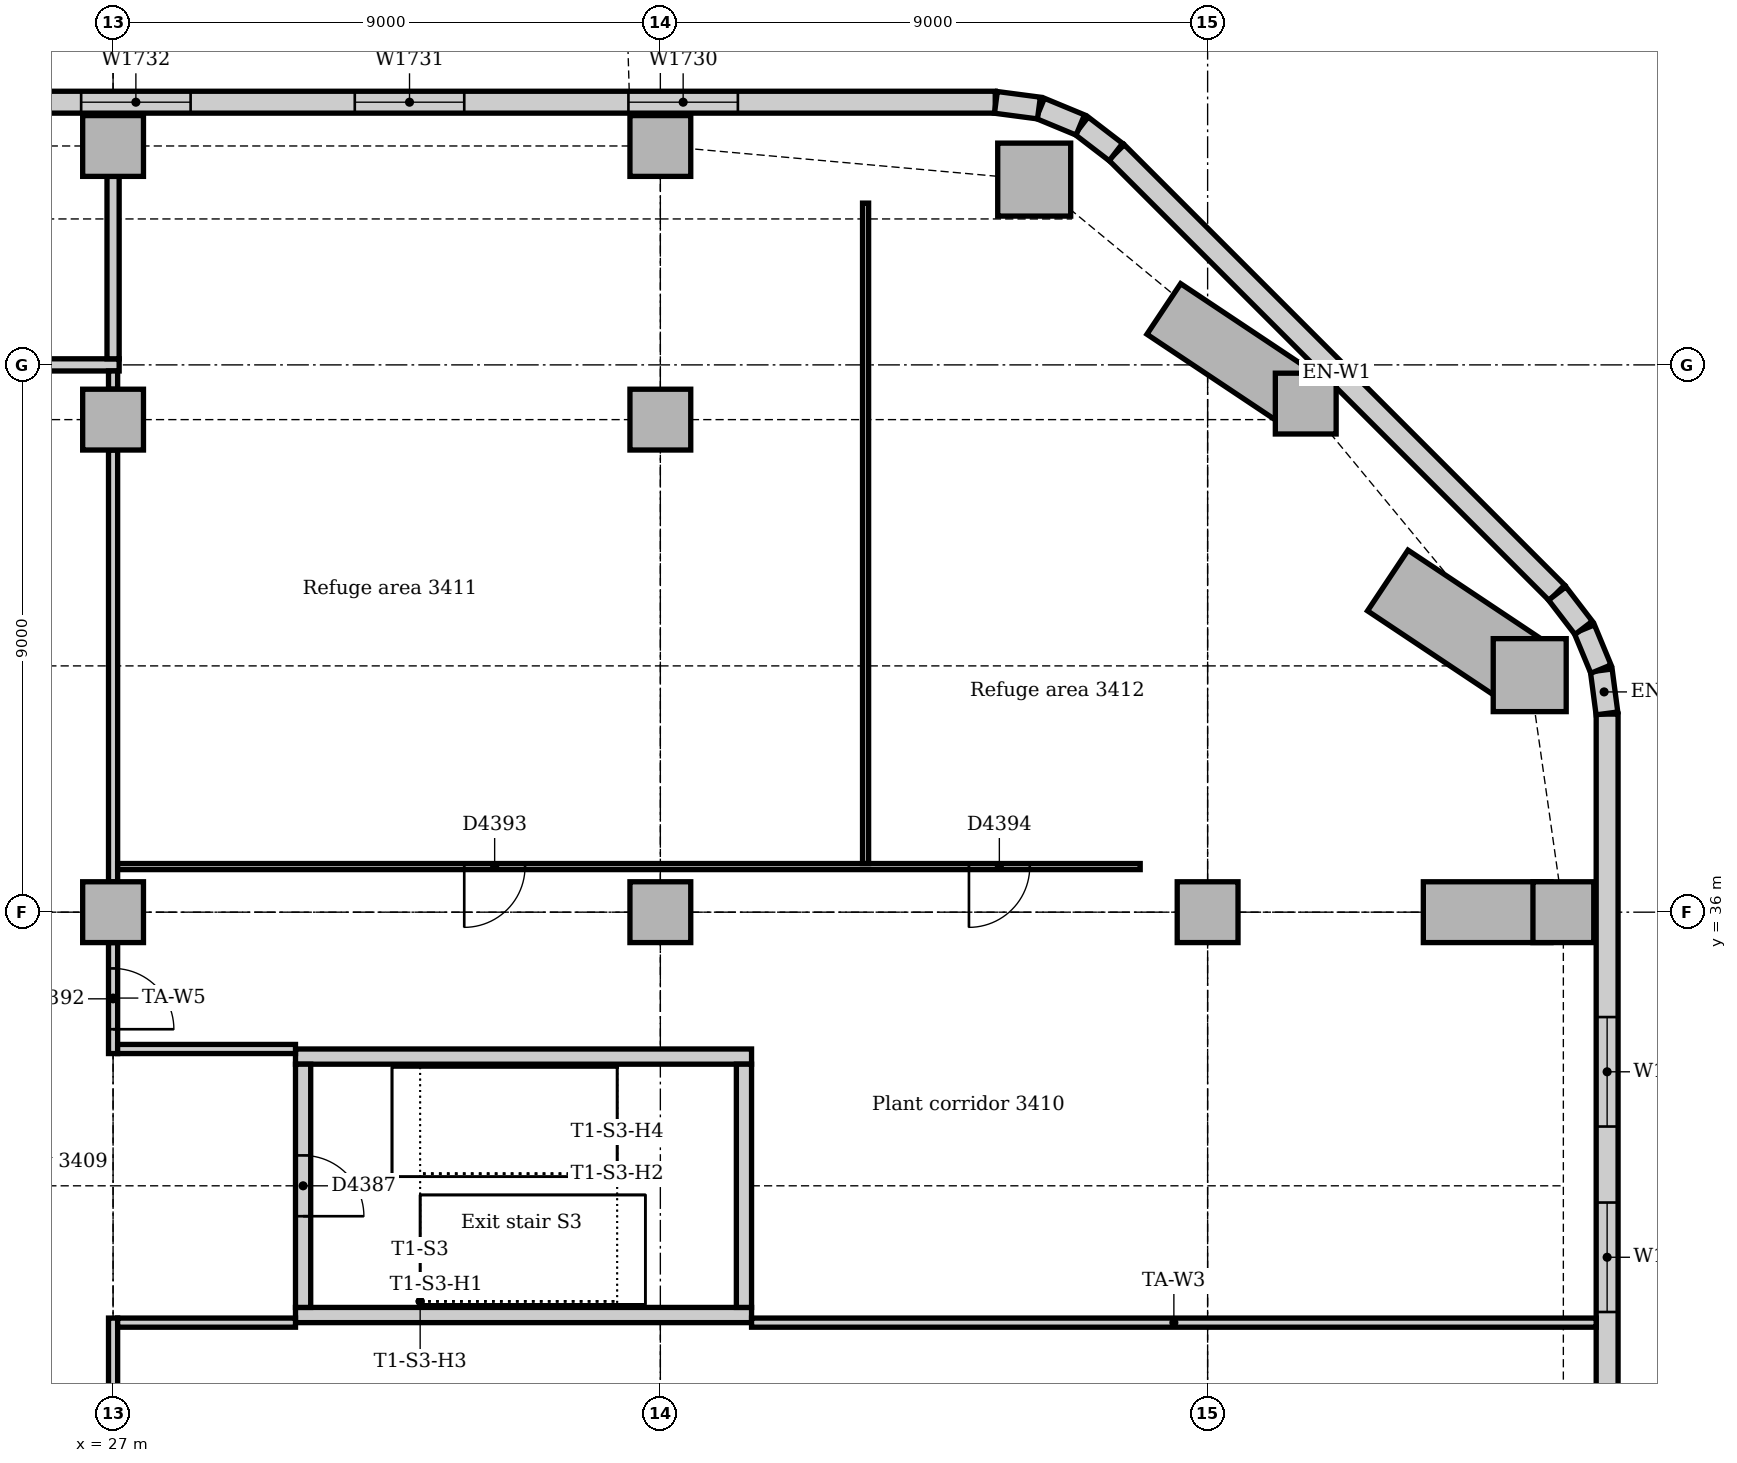
"""IFC4 building model, lengths in metres.
Left out: names, types, materials, properties, quantities, classifications, styles, units other than length and angle.
Written with IfcOpenShell. Run it as: python <this file> out.ifc"""

import sys

from ifc_helpers import new_model, si_unit, direction, frame, frame_2d, origin, origin_2d, place, context, subcontext, project, spatial, rectangle, extrude, element, fill, save


model = new_model("IFC4")
c1 = context("Model", 3, precision=1e-05, world=origin(), true_north=direction((0.0, 1.0)))
c2 = subcontext(c1, "Body", "Model", "MODEL_VIEW")
j1 = project(units=[si_unit("LENGTHUNIT", "METRE"), si_unit("PLANEANGLEUNIT", "RADIAN")], contexts=[c1])
p1 = place(None, origin())
s1 = spatial("IfcSite", under=j1, at=p1, CompositionType="ELEMENT")
p2 = place(p1, origin())
s2 = spatial("IfcBuilding", under=s1, at=p2, CompositionType="ELEMENT")
p3 = place(p2, frame((0.0, 0.0, 144.0)))
s3 = spatial("IfcBuildingStorey", under=s2, at=p3, CompositionType="ELEMENT", Elevation=144.0)
for number, where, z_axis, x_axis in (
    (1, (30.0, 29.375, 0.0), (0.0, 0.0, 1.0), (1.0, 0.0, 0.0)),
    (2, (37.5, 33.625, 0.0), (0.0, 0.0, 1.0), (-1.0, 0.0, 0.0)),
):
    element("IfcWall", number, at=place(p3, frame(where, z_axis=z_axis, x_axis=x_axis)), inside=s3, PredefinedType="SOLIDWALL", context=c2, shape_type="SweptSolid", body=[
        extrude(rectangle(XDim=7.5, YDim=0.25, at=frame_2d((3.75, 0.0))), origin(), (0.0, 0.0, 1.0), 5.0),
    ])
p4 = place(p3, frame((37.375, 29.5, 0.0), z_axis=(0.0, 0.0, 1.0), x_axis=(0.0, 1.0, 0.0)))
e3 = element("IfcWall", 3, at=p4, inside=s3, PredefinedType="SOLIDWALL", context=c2, shape_type="SweptSolid", body=[
    extrude(rectangle(XDim=4.0, YDim=0.25, at=frame_2d((2.0, 0.0))), origin(), (0.0, 0.0, 1.0), 5.0),
])
p5 = place(p3, frame((30.125, 33.5, 0.0), z_axis=(0.0, 0.0, 1.0), x_axis=(0.0, -1.0, 0.0)))
e4 = element("IfcWall", 4, at=p5, inside=s3, PredefinedType="SOLIDWALL", context=c2, shape_type="SweptSolid", body=[
    extrude(rectangle(XDim=4.0, YDim=0.25, at=frame_2d((2.0, 0.0))), origin(), (0.0, 0.0, 1.0), 5.0),
])
p6 = place(p5, frame((1.5, 0.0, 0.0)))
e5 = element("IfcOpeningElement", 5, at=p6, cuts=e4, PredefinedType="OPENING", context=c2, shape_type="SweptSolid", body=[
    extrude(rectangle(XDim=1.0, YDim=2.1, at=frame_2d((0.5, 1.05))), frame((0.0, 0.135, 0.0), z_axis=(0.0, -1.0, 0.0), x_axis=(1.0, 0.0, 0.0)), (0.0, 0.0, 1.0), 0.27),
])
for number, where, z_axis, x_axis in (
    (6, (50.297, 39.898, 0.0), (0.0, 0.0, 1.0), (1.0, 0.0, 0.0)),
    (7, (42.148, 48.047, 0.0), (0.0, 0.0, 1.0), (1.0, 0.0, 0.0)),
):
    element("IfcColumn", number, at=place(p3, frame(where, z_axis=z_axis, x_axis=x_axis)), inside=s3, PredefinedType="COLUMN", context=c2, shape_type="SweptSolid", body=[
        extrude(rectangle(XDim=1.2, YDim=1.2, at=origin_2d()), origin(), (0.0, 0.0, 1.0), 4.85),
    ])
for number, where, z_axis, x_axis in (
    (8, (50.85, 36.0, 0.0), (0.0, 0.0, 1.0), (1.0, 0.0, 0.0)),
    (9, (46.614, 44.364, 0.0), (0.0, 0.0, 1.0), (1.0, 0.0, 0.0)),
    (10, (27.0, 48.6, 0.0), (0.0, 0.0, 1.0), (1.0, 0.0, 0.0)),
    (11, (36.0, 48.6, 0.0), (0.0, 0.0, 1.0), (1.0, 0.0, 0.0)),
    (12, (27.0, 36.0, 0.0), (0.0, 0.0, 1.0), (1.0, 0.0, 0.0)),
    (13, (27.0, 44.1, 0.0), (0.0, 0.0, 1.0), (1.0, 0.0, 0.0)),
    (14, (36.0, 36.0, 0.0), (0.0, 0.0, 1.0), (1.0, 0.0, 0.0)),
    (15, (36.0, 44.1, 0.0), (0.0, 0.0, 1.0), (1.0, 0.0, 0.0)),
    (16, (45.0, 36.0, 0.0), (0.0, 0.0, 1.0), (1.0, 0.0, 0.0)),
):
    element("IfcColumn", number, at=place(p3, frame(where, z_axis=z_axis, x_axis=x_axis)), inside=s3, PredefinedType="COLUMN", context=c2, shape_type="SweptSolid", body=[
        extrude(rectangle(XDim=1.0, YDim=1.0, at=origin_2d()), origin(), (0.0, 0.0, 1.0), 4.85),
    ])
p7 = place(p3, frame((51.57, 14.743, 0.0), z_axis=(0.0, 0.0, 1.0), x_axis=(0.0, 1.0, 0.0)))
e17 = element("IfcWall", 17, at=p7, inside=s3, PredefinedType="STANDARD", context=c2, shape_type="SweptSolid", body=[
    extrude(rectangle(XDim=24.515, YDim=0.36, at=frame_2d((12.257, 0.0))), origin(), (0.0, 0.0, 1.0), 4.85),
])
p8 = place(p7, frame((4.257, 0.0, 0.9)))
e18 = element("IfcOpeningElement", 18, at=p8, cuts=e17, PredefinedType="OPENING", context=c2, shape_type="SweptSolid", body=[
    extrude(rectangle(XDim=1.8, YDim=2.2, at=frame_2d((0.9, 1.1))), frame((0.0, 0.19, 0.0), z_axis=(0.0, -1.0, 0.0), x_axis=(1.0, 0.0, 0.0)), (0.0, 0.0, 1.0), 0.38),
])
p9 = place(p7, frame((8.007, 0.0, 1.2)))
e19 = element("IfcOpeningElement", 19, at=p9, cuts=e17, PredefinedType="OPENING", context=c2, shape_type="SweptSolid", body=[
    extrude(rectangle(XDim=1.8, YDim=1.2, at=frame_2d((0.9, 0.6))), frame((0.0, 0.19, 0.0), z_axis=(0.0, -1.0, 0.0), x_axis=(1.0, 0.0, 0.0)), (0.0, 0.0, 1.0), 0.38),
])
p10 = place(p7, frame((14.682, 0.0, 0.9)))
e20 = element("IfcOpeningElement", 20, at=p10, cuts=e17, PredefinedType="OPENING", context=c2, shape_type="SweptSolid", body=[
    extrude(rectangle(XDim=1.8, YDim=2.2, at=frame_2d((0.9, 1.1))), frame((0.0, 0.19, 0.0), z_axis=(0.0, -1.0, 0.0), x_axis=(1.0, 0.0, 0.0)), (0.0, 0.0, 1.0), 0.38),
])
p11 = place(p7, frame((17.732, 0.0, 0.9)))
e21 = element("IfcOpeningElement", 21, at=p11, cuts=e17, PredefinedType="OPENING", context=c2, shape_type="SweptSolid", body=[
    extrude(rectangle(XDim=1.8, YDim=2.2, at=frame_2d((0.9, 1.1))), frame((0.0, 0.19, 0.0), z_axis=(0.0, -1.0, 0.0), x_axis=(1.0, 0.0, 0.0)), (0.0, 0.0, 1.0), 0.38),
])
p12 = place(p3, frame((50.744, 41.251, 0.0), z_axis=(0.0, 0.0, 1.0), x_axis=(-0.707106781187, 0.707106781187, 0.0)))
e22 = element("IfcWall", 22, at=p12, inside=s3, PredefinedType="STANDARD", context=c2, shape_type="SweptSolid", body=[
    extrude(rectangle(XDim=10.243, YDim=0.36, at=frame_2d((5.121, 0.0))), origin(), (0.0, 0.0, 1.0), 3.25),
])
p13 = place(p3, frame((41.507, 49.32, 0.0), z_axis=(0.0, 0.0, 1.0), x_axis=(-1.0, 0.0, 0.0)))
e23 = element("IfcWall", 23, at=p13, inside=s3, PredefinedType="STANDARD", context=c2, shape_type="SweptSolid", body=[
    extrude(rectangle(XDim=37.265, YDim=0.36, at=frame_2d((18.632, 0.0))), origin(), (0.0, 0.0, 1.0), 3.25),
])
p14 = place(p13, frame((4.232, 0.0, 1.2)))
e24 = element("IfcOpeningElement", 24, at=p14, cuts=e23, PredefinedType="OPENING", context=c2, shape_type="SweptSolid", body=[
    extrude(rectangle(XDim=1.8, YDim=1.2, at=frame_2d((0.9, 0.6))), frame((0.0, 0.19, 0.0), z_axis=(0.0, -1.0, 0.0), x_axis=(1.0, 0.0, 0.0)), (0.0, 0.0, 1.0), 0.38),
])
p15 = place(p13, frame((8.732, 0.0, 1.2)))
e25 = element("IfcOpeningElement", 25, at=p15, cuts=e23, PredefinedType="OPENING", context=c2, shape_type="SweptSolid", body=[
    extrude(rectangle(XDim=1.8, YDim=1.2, at=frame_2d((0.9, 0.6))), frame((0.0, 0.19, 0.0), z_axis=(0.0, -1.0, 0.0), x_axis=(1.0, 0.0, 0.0)), (0.0, 0.0, 1.0), 0.38),
])
p16 = place(p13, frame((13.232, 0.0, 1.2)))
e26 = element("IfcOpeningElement", 26, at=p16, cuts=e23, PredefinedType="OPENING", context=c2, shape_type="SweptSolid", body=[
    extrude(rectangle(XDim=1.8, YDim=1.2, at=frame_2d((0.9, 0.6))), frame((0.0, 0.19, 0.0), z_axis=(0.0, -1.0, 0.0), x_axis=(1.0, 0.0, 0.0)), (0.0, 0.0, 1.0), 0.38),
])
p17 = place(p13, frame((17.732, 0.0, 1.2)))
e27 = element("IfcOpeningElement", 27, at=p17, cuts=e23, PredefinedType="OPENING", context=c2, shape_type="SweptSolid", body=[
    extrude(rectangle(XDim=1.8, YDim=1.2, at=frame_2d((0.9, 0.6))), frame((0.0, 0.19, 0.0), z_axis=(0.0, -1.0, 0.0), x_axis=(1.0, 0.0, 0.0)), (0.0, 0.0, 1.0), 0.38),
])
p18 = place(p13, frame((22.232, 0.0, 1.2)))
e28 = element("IfcOpeningElement", 28, at=p18, cuts=e23, PredefinedType="OPENING", context=c2, shape_type="SweptSolid", body=[
    extrude(rectangle(XDim=1.8, YDim=1.2, at=frame_2d((0.9, 0.6))), frame((0.0, 0.19, 0.0), z_axis=(0.0, -1.0, 0.0), x_axis=(1.0, 0.0, 0.0)), (0.0, 0.0, 1.0), 0.38),
])
p19 = place(p13, frame((26.732, 0.0, 1.2)))
e29 = element("IfcOpeningElement", 29, at=p19, cuts=e23, PredefinedType="OPENING", context=c2, shape_type="SweptSolid", body=[
    extrude(rectangle(XDim=1.8, YDim=1.2, at=frame_2d((0.9, 0.6))), frame((0.0, 0.19, 0.0), z_axis=(0.0, -1.0, 0.0), x_axis=(1.0, 0.0, 0.0)), (0.0, 0.0, 1.0), 0.38),
])
p20 = place(p13, frame((31.232, 0.0, 1.2)))
e30 = element("IfcOpeningElement", 30, at=p20, cuts=e23, PredefinedType="OPENING", context=c2, shape_type="SweptSolid", body=[
    extrude(rectangle(XDim=1.8, YDim=1.2, at=frame_2d((0.9, 0.6))), frame((0.0, 0.19, 0.0), z_axis=(0.0, -1.0, 0.0), x_axis=(1.0, 0.0, 0.0)), (0.0, 0.0, 1.0), 0.38),
])
for number, where, z_axis, x_axis in (
    (31, (51.567, 39.269, 0.0), (0.0, 0.0, 1.0), (-0.131, 0.991, 0.0)),
    (32, (51.468, 39.997, 0.0), (0.0, 0.0, 1.0), (-0.383, 0.924, 0.0)),
):
    element("IfcWall", number, at=place(p3, frame(where, z_axis=z_axis, x_axis=x_axis)), inside=s3, PredefinedType="STANDARD", context=c2, shape_type="SweptSolid", body=[
        extrude(rectangle(XDim=0.713, YDim=0.36, at=frame_2d((0.356, 0.0))), origin(), (0.0, 0.0, 1.0), 3.25),
    ])
for number, where, z_axis, x_axis in (
    (33, (51.184, 40.675, 0.0), (0.0, 0.0, 1.0), (-0.609, 0.793, 0.0)),
    (34, (43.491, 48.5, 0.0), (0.0, 0.0, 1.0), (-0.793, 0.609, 0.0)),
):
    element("IfcWall", number, at=place(p3, frame(where, z_axis=z_axis, x_axis=x_axis)), inside=s3, PredefinedType="STANDARD", context=c2, shape_type="SweptSolid", body=[
        extrude(rectangle(XDim=0.713, YDim=0.36, at=frame_2d((0.357, 0.0))), origin(), (0.0, 0.0, 1.0), 3.25),
    ])
for number, where, z_axis, x_axis in (
    (35, (42.906, 48.945, 0.0), (0.0, 0.0, 1.0), (-0.924, 0.383, 0.0)),
    (36, (42.226, 49.224, 0.0), (0.0, 0.0, 1.0), (-0.991, 0.131, 0.0)),
):
    element("IfcWall", number, at=place(p3, frame(where, z_axis=z_axis, x_axis=x_axis)), inside=s3, PredefinedType="STANDARD", context=c2, shape_type="SweptSolid", body=[
        extrude(rectangle(XDim=0.713, YDim=0.36, at=frame_2d((0.356, 0.0))), origin(), (0.0, 0.0, 1.0), 3.25),
    ])
p21 = place(p3, frame((0.36, 45.0, 0.0), z_axis=(0.0, 0.0, 1.0), x_axis=(1.0, 0.0, 0.0)))
e37 = element("IfcWall", 37, at=p21, inside=s3, PredefinedType="PARTITIONING", context=c2, shape_type="SweptSolid", body=[
    extrude(rectangle(XDim=26.74, YDim=0.2, at=frame_2d((13.37, 0.0))), origin(), (0.0, 0.0, 1.0), 4.85),
])
p22 = place(p21, frame((9.15, 0.0, 0.0)))
e38 = element("IfcOpeningElement", 38, at=p22, cuts=e37, PredefinedType="OPENING", context=c2, shape_type="SweptSolid", body=[
    extrude(rectangle(XDim=1.0, YDim=2.1, at=frame_2d((0.5, 1.05))), frame((0.0, 0.11, 0.0), z_axis=(0.0, -1.0, 0.0), x_axis=(1.0, 0.0, 0.0)), (0.0, 0.0, 1.0), 0.22),
])
p23 = place(p21, frame((21.59, 0.0, 0.0)))
e39 = element("IfcOpeningElement", 39, at=p23, cuts=e37, PredefinedType="OPENING", context=c2, shape_type="SweptSolid", body=[
    extrude(rectangle(XDim=1.0, YDim=2.1, at=frame_2d((0.5, 1.05))), frame((0.0, 0.11, 0.0), z_axis=(0.0, -1.0, 0.0), x_axis=(1.0, 0.0, 0.0)), (0.0, 0.0, 1.0), 0.22),
])
p24 = place(p3, frame((27.0, 45.1, 0.0), z_axis=(0.0, 0.0, 1.0), x_axis=(0.0, 1.0, 0.0)))
e40 = element("IfcWall", 40, at=p24, inside=s3, PredefinedType="PARTITIONING", context=c2, shape_type="SweptSolid", body=[
    extrude(rectangle(XDim=3.0, YDim=0.2, at=frame_2d((1.5, 0.0))), origin(), (0.0, 0.0, 1.0), 4.85),
])
p25 = place(p3, frame((27.0, 33.675, 0.0), z_axis=(0.0, 0.0, 1.0), x_axis=(0.0, 1.0, 0.0)))
e41 = element("IfcWall", 41, at=p25, inside=s3, PredefinedType="PARTITIONING", context=c2, shape_type="SweptSolid", body=[
    extrude(rectangle(XDim=1.825, YDim=0.15, at=frame_2d((0.912, 0.0))), origin(), (0.0, 0.0, 1.0), 4.362),
])
p26 = place(p25, frame((0.4, 0.0, 0.0)))
e42 = element("IfcOpeningElement", 42, at=p26, cuts=e41, PredefinedType="OPENING", context=c2, shape_type="SweptSolid", body=[
    extrude(rectangle(XDim=1.0, YDim=2.1, at=frame_2d((0.5, 1.05))), frame((0.0, 0.085, 0.0), z_axis=(0.0, -1.0, 0.0), x_axis=(1.0, 0.0, 0.0)), (0.0, 0.0, 1.0), 0.17),
])
p27 = place(p3, frame((27.0, 36.5, 0.0), z_axis=(0.0, 0.0, 1.0), x_axis=(0.0, 1.0, 0.0)))
e43 = element("IfcWall", 43, at=p27, inside=s3, PredefinedType="PARTITIONING", context=c2, shape_type="SweptSolid", body=[
    extrude(rectangle(XDim=7.1, YDim=0.15, at=frame_2d((3.55, 0.0))), origin(), (0.0, 0.0, 1.0), 4.362),
])
p28 = place(p3, frame((27.0, 44.6, 0.0), z_axis=(0.0, 0.0, 1.0), x_axis=(0.0, 1.0, 0.0)))
e44 = element("IfcWall", 44, at=p28, inside=s3, PredefinedType="PARTITIONING", context=c2, shape_type="SweptSolid", body=[
    extrude(rectangle(XDim=0.3, YDim=0.15, at=frame_2d((0.15, 0.0))), origin(), (0.0, 0.0, 1.0), 4.85),
])
p29 = place(p3, frame((27.0, 27.5, 0.0), z_axis=(0.0, 0.0, 1.0), x_axis=(0.0, 1.0, 0.0)))
e45 = element("IfcWall", 45, at=p29, inside=s3, PredefinedType="PARTITIONING", context=c2, shape_type="SweptSolid", body=[
    extrude(rectangle(XDim=1.825, YDim=0.15, at=frame_2d((0.912, 0.0))), origin(), (0.0, 0.0, 1.0), 4.362),
])
for number, where, z_axis, x_axis in (
    (46, (27.075, 29.25, 0.0), (0.0, 0.0, 1.0), (1.0, 0.0, 0.0)),
    (47, (27.075, 33.75, 0.0), (0.0, 0.0, 1.0), (1.0, 0.0, 0.0)),
):
    element("IfcWall", number, at=place(p3, frame(where, z_axis=z_axis, x_axis=x_axis)), inside=s3, PredefinedType="PARTITIONING", context=c2, shape_type="SweptSolid", body=[
        extrude(rectangle(XDim=2.925, YDim=0.15, at=frame_2d((1.462, 0.0))), origin(), (0.0, 0.0, 1.0), 4.85),
    ])
p30 = place(p3, frame((37.5, 29.25, 0.0), z_axis=(0.0, 0.0, 1.0), x_axis=(1.0, 0.0, 0.0)))
e48 = element("IfcWall", 48, at=p30, inside=s3, PredefinedType="PARTITIONING", context=c2, shape_type="SweptSolid", body=[
    extrude(rectangle(XDim=13.89, YDim=0.15, at=frame_2d((6.945, 0.0))), origin(), (0.0, 0.0, 1.0), 4.85),
])
p31 = place(p3, frame((27.075, 36.75, 0.0), z_axis=(0.0, 0.0, 1.0), x_axis=(1.0, 0.0, 0.0)))
e49 = element("IfcWall", 49, at=p31, inside=s3, PredefinedType="PARTITIONING", context=c2, shape_type="SweptSolid", body=[
    extrude(rectangle(XDim=16.816, YDim=0.1, at=frame_2d((8.408, 0.0))), origin(), (0.0, 0.0, 1.0), 4.85),
])
p32 = place(p31, frame((5.7, 0.0, 0.0)))
e50 = element("IfcOpeningElement", 50, at=p32, cuts=e49, PredefinedType="OPENING", context=c2, shape_type="SweptSolid", body=[
    extrude(rectangle(XDim=1.0, YDim=2.1, at=frame_2d((0.5, 1.05))), frame((0.0, 0.06, 0.0), z_axis=(0.0, -1.0, 0.0), x_axis=(1.0, 0.0, 0.0)), (0.0, 0.0, 1.0), 0.12),
])
p33 = place(p31, frame((14.0, 0.0, 0.0)))
e51 = element("IfcOpeningElement", 51, at=p33, cuts=e49, PredefinedType="OPENING", context=c2, shape_type="SweptSolid", body=[
    extrude(rectangle(XDim=1.0, YDim=2.1, at=frame_2d((0.5, 1.05))), frame((0.0, 0.06, 0.0), z_axis=(0.0, -1.0, 0.0), x_axis=(1.0, 0.0, 0.0)), (0.0, 0.0, 1.0), 0.12),
])
p34 = place(p3, frame((39.375, 36.8, 0.0), z_axis=(0.0, 0.0, 1.0), x_axis=(0.0, 1.0, 0.0)))
e52 = element("IfcWall", 52, at=p34, inside=s3, PredefinedType="PARTITIONING", context=c2, shape_type="SweptSolid", body=[
    extrude(rectangle(XDim=10.86, YDim=0.1, at=frame_2d((5.43, 0.0))), origin(), (0.0, 0.0, 1.0), 4.85),
])
p35 = place(p10, origin())
e53 = element("IfcWindow", 53, at=p35, inside=s3, PartitioningType="SINGLE_PANEL", PredefinedType="WINDOW", context=c2, shape_type="SweptSolid", body=[
    extrude(rectangle(XDim=1.8, YDim=2.2, at=frame_2d((0.9, 1.1))), frame((0.0, 0.13, 0.0), z_axis=(0.0, -1.0, 0.0), x_axis=(1.0, 0.0, 0.0)), (0.0, 0.0, 1.0), 0.06),
])
fill(e20, e53)
p36 = place(p11, origin())
e54 = element("IfcWindow", 54, at=p36, inside=s3, PartitioningType="SINGLE_PANEL", PredefinedType="WINDOW", context=c2, shape_type="SweptSolid", body=[
    extrude(rectangle(XDim=1.8, YDim=2.2, at=frame_2d((0.9, 1.1))), frame((0.0, 0.13, 0.0), z_axis=(0.0, -1.0, 0.0), x_axis=(1.0, 0.0, 0.0)), (0.0, 0.0, 1.0), 0.06),
])
fill(e21, e54)
p37 = place(p14, origin())
e55 = element("IfcWindow", 55, at=p37, inside=s3, PartitioningType="SINGLE_PANEL", PredefinedType="WINDOW", context=c2, shape_type="SweptSolid", body=[
    extrude(rectangle(XDim=1.8, YDim=1.2, at=frame_2d((0.9, 0.6))), frame((0.0, 0.13, 0.0), z_axis=(0.0, -1.0, 0.0), x_axis=(1.0, 0.0, 0.0)), (0.0, 0.0, 1.0), 0.06),
])
fill(e24, e55)
p38 = place(p15, origin())
e56 = element("IfcWindow", 56, at=p38, inside=s3, PartitioningType="SINGLE_PANEL", PredefinedType="WINDOW", context=c2, shape_type="SweptSolid", body=[
    extrude(rectangle(XDim=1.8, YDim=1.2, at=frame_2d((0.9, 0.6))), frame((0.0, 0.13, 0.0), z_axis=(0.0, -1.0, 0.0), x_axis=(1.0, 0.0, 0.0)), (0.0, 0.0, 1.0), 0.06),
])
fill(e25, e56)
p39 = place(p16, origin())
e57 = element("IfcWindow", 57, at=p39, inside=s3, PartitioningType="SINGLE_PANEL", PredefinedType="WINDOW", context=c2, shape_type="SweptSolid", body=[
    extrude(rectangle(XDim=1.8, YDim=1.2, at=frame_2d((0.9, 0.6))), frame((0.0, 0.13, 0.0), z_axis=(0.0, -1.0, 0.0), x_axis=(1.0, 0.0, 0.0)), (0.0, 0.0, 1.0), 0.06),
])
fill(e26, e57)
p40 = place(p6, origin())
e58 = element("IfcDoor", 58, at=p40, inside=s3, OperationType="SINGLE_SWING_RIGHT", PredefinedType="DOOR", context=c2, shape_type="SweptSolid", body=[
    extrude(rectangle(XDim=1.0, YDim=2.1, at=frame_2d((0.5, 1.05))), frame((0.0, 0.025, 0.0), z_axis=(0.0, -1.0, 0.0), x_axis=(1.0, 0.0, 0.0)), (0.0, 0.0, 1.0), 0.05),
])
fill(e5, e58)
p41 = place(p26, frame((1.0, 0.0, 0.0), z_axis=(0.0, 0.0, 1.0), x_axis=(-1.0, 0.0, 0.0)))
e59 = element("IfcDoor", 59, at=p41, inside=s3, OperationType="SINGLE_SWING_RIGHT", PredefinedType="DOOR", context=c2, shape_type="SweptSolid", body=[
    extrude(rectangle(XDim=1.0, YDim=2.1, at=frame_2d((0.5, 1.05))), frame((0.0, 0.025, 0.0), z_axis=(0.0, -1.0, 0.0), x_axis=(1.0, 0.0, 0.0)), (0.0, 0.0, 1.0), 0.05),
])
fill(e42, e59)
p42 = place(p32, frame((1.0, 0.0, 0.0), z_axis=(0.0, 0.0, 1.0), x_axis=(-1.0, 0.0, 0.0)))
e60 = element("IfcDoor", 60, at=p42, inside=s3, OperationType="SINGLE_SWING_RIGHT", PredefinedType="DOOR", context=c2, shape_type="SweptSolid", body=[
    extrude(rectangle(XDim=1.0, YDim=2.1, at=frame_2d((0.5, 1.05))), frame((0.0, 0.025, 0.0), z_axis=(0.0, -1.0, 0.0), x_axis=(1.0, 0.0, 0.0)), (0.0, 0.0, 1.0), 0.05),
])
fill(e50, e60)
p43 = place(p33, frame((1.0, 0.0, 0.0), z_axis=(0.0, 0.0, 1.0), x_axis=(-1.0, 0.0, 0.0)))
e61 = element("IfcDoor", 61, at=p43, inside=s3, OperationType="SINGLE_SWING_RIGHT", PredefinedType="DOOR", context=c2, shape_type="SweptSolid", body=[
    extrude(rectangle(XDim=1.0, YDim=2.1, at=frame_2d((0.5, 1.05))), frame((0.0, 0.025, 0.0), z_axis=(0.0, -1.0, 0.0), x_axis=(1.0, 0.0, 0.0)), (0.0, 0.0, 1.0), 0.05),
])
fill(e51, e61)
save(model, sys.argv[1])
